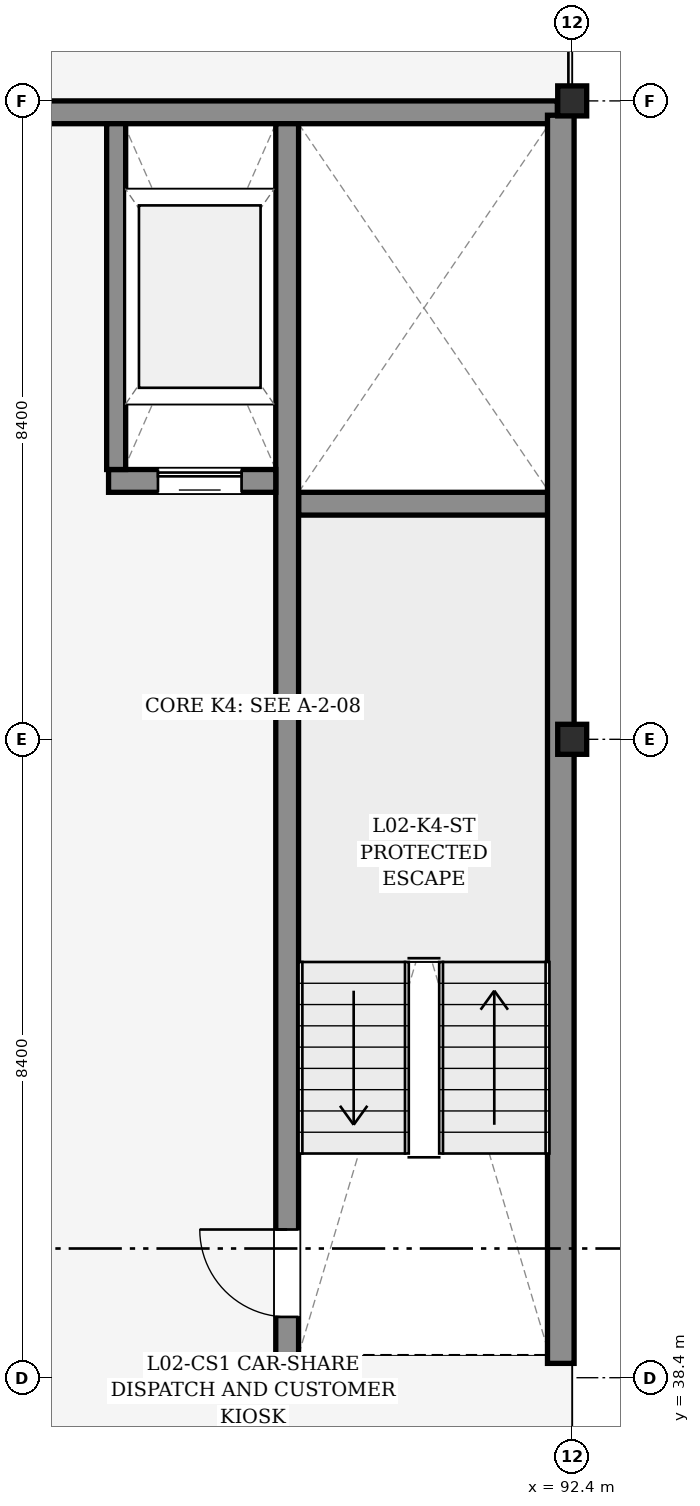
"""IFC4 building model, lengths in metres.
Left out: names, types, materials, properties, quantities, classifications, styles, units other than length and angle.
Written with IfcOpenShell. Run it as: python <this file> out.ifc"""

import sys

from ifc_helpers import new_model, si_unit, direction, frame, frame_2d, origin, origin_2d, place, context, subcontext, project, spatial, rectangle, i_section, extrude, element, fill, save


model = new_model("IFC4")
c1 = context("Model", 3, precision=1e-05, world=origin(), true_north=direction((0.0, 1.0)))
c2 = subcontext(c1, "Body", "Model", "MODEL_VIEW")
j1 = project(units=[si_unit("LENGTHUNIT", "METRE"), si_unit("PLANEANGLEUNIT", "RADIAN")], contexts=[c1])
p1 = place(None, origin())
s1 = spatial("IfcSite", under=j1, at=p1, CompositionType="ELEMENT")
p2 = place(p1, origin())
s2 = spatial("IfcBuilding", under=s1, at=p2, CompositionType="ELEMENT")
p3 = place(p2, frame((0.0, 0.0, 9.0)))
s3 = spatial("IfcBuildingStorey", under=s2, at=p3, CompositionType="ELEMENT", Elevation=9.0)
for number, where, z_axis, x_axis in (
    (1, (92.4, 38.4, 0.0), (0.0, 0.0, 1.0), (1.0, 0.0, 0.0)),
    (2, (92.4, 46.8, 0.0), (0.0, 0.0, 1.0), (1.0, 0.0, 0.0)),
    (3, (92.4, 55.2, 0.0), (0.0, 0.0, 1.0), (1.0, 0.0, 0.0)),
):
    element("IfcColumn", number, at=place(p3, frame(where, z_axis=z_axis, x_axis=x_axis)), inside=s3, PredefinedType="COLUMN", context=c2, shape_type="SweptSolid", body=[
        extrude(i_section(OverallWidth=0.395, OverallDepth=0.381, WebThickness=0.018, FlangeThickness=0.03, FilletRadius=0.015, at=origin_2d()), origin(), (0.0, 0.0, 1.0), 3.6),
    ])
for number, where, z_axis, x_axis in (
    (4, (84.196, 38.55, 0.0), (0.0, 0.0, 1.0), (1.0, 0.0, 0.0)),
    (5, (84.196, 55.05, 0.0), (0.0, 0.0, 1.0), (1.0, 0.0, 0.0)),
):
    element("IfcWall", number, at=place(p3, frame(where, z_axis=z_axis, x_axis=x_axis)), inside=s3, PredefinedType="SHEAR", context=c2, shape_type="SweptSolid", body=[
        extrude(rectangle(XDim=8.009, YDim=0.3, at=frame_2d((4.004, 0.0))), origin(), (0.0, 0.0, 1.0), 3.38),
    ])
p4 = place(p3, frame((88.8, 49.9, 0.0), z_axis=(0.0, 0.0, 1.0), x_axis=(1.0, 0.0, 0.0)))
e6 = element("IfcWall", 6, at=p4, inside=s3, PredefinedType="SHEAR", context=c2, shape_type="SweptSolid", body=[
    extrude(rectangle(XDim=3.3, YDim=0.3, at=frame_2d((1.65, 0.0))), origin(), (0.0, 0.0, 1.0), 3.38),
])
p5 = place(p3, frame((92.25, 38.588, 0.0), z_axis=(0.0, 0.0, 1.0), x_axis=(0.0, 1.0, 0.0)))
e7 = element("IfcWall", 7, at=p5, inside=s3, PredefinedType="SHEAR", context=c2, shape_type="SweptSolid", body=[
    extrude(rectangle(XDim=16.423, YDim=0.35, at=frame_2d((8.211, 0.0))), origin(), (0.0, 0.0, 1.0), 3.38),
])
p6 = place(p3, frame((88.65, 38.7, 0.0), z_axis=(0.0, 0.0, 1.0), x_axis=(0.0, 1.0, 0.0)))
e8 = element("IfcWall", 8, at=p6, inside=s3, PredefinedType="SHEAR", context=c2, shape_type="SweptSolid", body=[
    extrude(rectangle(XDim=16.2, YDim=0.3, at=frame_2d((8.1, 0.0))), origin(), (0.0, 0.0, 1.0), 3.38),
])
p7 = place(p6, frame((0.5, 0.0, 0.0)))
e9 = element("IfcOpeningElement", 9, at=p7, cuts=e8, PredefinedType="OPENING", context=c2, shape_type="SweptSolid", body=[
    extrude(rectangle(XDim=1.15, YDim=2.15, at=frame_2d((0.575, 1.075))), frame((0.0, 0.16, 0.0), z_axis=(0.0, -1.0, 0.0), x_axis=(1.0, 0.0, 0.0)), (0.0, 0.0, 1.0), 0.32),
])
p8 = place(p3, frame((86.3, 50.2, 0.0), z_axis=(0.0, 0.0, 1.0), x_axis=(1.0, 0.0, 0.0)))
e10 = element("IfcWall", 10, at=p8, inside=s3, PredefinedType="SHEAR", context=c2, shape_type="SweptSolid", body=[
    extrude(rectangle(XDim=2.2, YDim=0.3, at=frame_2d((1.1, 0.0))), origin(), (0.0, 0.0, 1.0), 3.38),
])
p9 = place(p8, frame((0.65, 0.0, 0.0)))
e11 = element("IfcOpeningElement", 11, at=p9, cuts=e10, PredefinedType="OPENING", context=c2, shape_type="SweptSolid", body=[
    extrude(rectangle(XDim=1.1, YDim=2.2, at=frame_2d((0.55, 1.1))), frame((0.0, 0.16, 0.0), z_axis=(0.0, -1.0, 0.0), x_axis=(1.0, 0.0, 0.0)), (0.0, 0.0, 1.0), 0.32),
])
p10 = place(p3, frame((86.4, 50.35, 0.0), z_axis=(0.0, 0.0, 1.0), x_axis=(0.0, 1.0, 0.0)))
e12 = element("IfcWall", 12, at=p10, inside=s3, PredefinedType="PARTITIONING", context=c2, shape_type="SweptSolid", body=[
    extrude(rectangle(XDim=4.55, YDim=0.25, at=frame_2d((2.275, 0.0))), origin(), (0.0, 0.0, 1.0), 2.525),
])
p11 = place(p7, origin())
e13 = element("IfcDoor", 13, at=p11, inside=s3, OperationType="SINGLE_SWING_RIGHT", PredefinedType="DOOR", context=c2, shape_type="SweptSolid", body=[
    extrude(rectangle(XDim=1.15, YDim=2.15, at=frame_2d((0.575, 1.075))), frame((0.0, 0.025, 0.0), z_axis=(0.0, -1.0, 0.0), x_axis=(1.0, 0.0, 0.0)), (0.0, 0.0, 1.0), 0.05),
])
fill(e9, e13)
p12 = place(p9, origin())
e14 = element("IfcDoor", 14, at=p12, inside=s3, OperationType="SLIDING_TO_LEFT", PredefinedType="DOOR", context=c2, shape_type="SweptSolid", body=[
    extrude(rectangle(XDim=1.1, YDim=2.2, at=frame_2d((0.55, 1.1))), frame((0.0, 0.025, 0.0), z_axis=(0.0, -1.0, 0.0), x_axis=(1.0, 0.0, 0.0)), (0.0, 0.0, 1.0), 0.05),
])
fill(e11, e14)
save(model, sys.argv[1])
